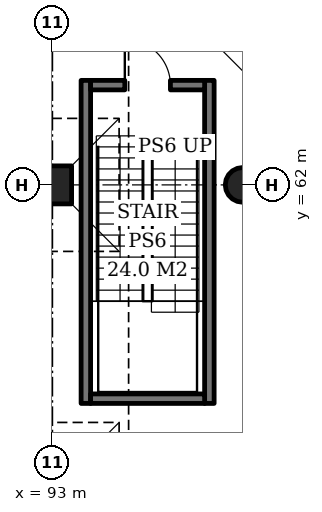
"""IFC4 building model, lengths in metres.
Left out: names, types, materials, properties, quantities, classifications, styles, units other than length and angle.
Written with IfcOpenShell. Run it as: python <this file> out.ifc"""

import sys

from ifc_helpers import new_model, si_unit, direction, frame, frame_2d, origin, origin_2d, place, context, subcontext, project, spatial, rectangle, hollow_circle, extrude, element, fill, save


model = new_model("IFC4")
c1 = context("Model", 3, precision=1e-05, world=origin(), true_north=direction((0.0, 1.0)))
c2 = subcontext(c1, "Body", "Model", "MODEL_VIEW")
j1 = project(units=[si_unit("LENGTHUNIT", "METRE"), si_unit("PLANEANGLEUNIT", "RADIAN")], contexts=[c1])
p1 = place(None, origin())
s1 = spatial("IfcSite", under=j1, at=p1, CompositionType="ELEMENT")
p2 = place(p1, origin())
s2 = spatial("IfcBuilding", under=s1, at=p2, CompositionType="ELEMENT")
p3 = place(p2, frame((0.0, 0.0, -10.0)))
s3 = spatial("IfcBuildingStorey", under=s2, at=p3, CompositionType="ELEMENT", Elevation=-10.0)
p4 = place(p3, frame((93.0, 62.0, 0.0), z_axis=(0.0, 0.0, 1.0), x_axis=(1.0, 0.0, 0.0)))
e1 = element("IfcColumn", 1, at=p4, inside=s3, PredefinedType="COLUMN", context=c2, shape_type="SweptSolid", body=[
    extrude(rectangle(XDim=1.0, YDim=1.0, at=origin_2d()), origin(), (0.0, 0.0, 1.0), 5.0),
])
p5 = place(p3, frame((98.0, 62.0, 0.0), z_axis=(0.0, 0.0, 1.0), x_axis=(1.0, 0.0, 0.0)))
e2 = element("IfcColumn", 2, at=p5, inside=s3, PredefinedType="COLUMN", context=c2, shape_type="SweptSolid", body=[
    extrude(hollow_circle(Radius=0.457, WallThickness=0.03, at=origin_2d()), origin(), (0.0, 0.0, 1.0), 5.0),
])
for number, where, z_axis, x_axis in (
    (3, (93.875, 56.25, 0.0), (0.0, 0.0, 1.0), (0.0, 1.0, 0.0)),
    (4, (97.125, 56.25, 0.0), (0.0, 0.0, 1.0), (0.0, 1.0, 0.0)),
):
    element("IfcWall", number, at=place(p3, frame(where, z_axis=z_axis, x_axis=x_axis)), inside=s3, PredefinedType="SOLIDWALL", context=c2, shape_type="SweptSolid", body=[
        extrude(rectangle(XDim=8.5, YDim=0.25, at=frame_2d((4.25, 0.0))), origin(), (0.0, 0.0, 1.0), 4.7),
    ])
p6 = place(p3, frame((94.0, 56.375, 0.0), z_axis=(0.0, 0.0, 1.0), x_axis=(1.0, 0.0, 0.0)))
e5 = element("IfcWall", 5, at=p6, inside=s3, PredefinedType="SOLIDWALL", context=c2, shape_type="SweptSolid", body=[
    extrude(rectangle(XDim=3.0, YDim=0.25, at=frame_2d((1.5, 0.0))), origin(), (0.0, 0.0, 1.0), 4.7),
])
p7 = place(p3, frame((94.0, 64.625, 0.0), z_axis=(0.0, 0.0, 1.0), x_axis=(1.0, 0.0, 0.0)))
e6 = element("IfcWall", 6, at=p7, inside=s3, PredefinedType="SOLIDWALL", context=c2, shape_type="SweptSolid", body=[
    extrude(rectangle(XDim=3.0, YDim=0.25, at=frame_2d((1.5, 0.0))), origin(), (0.0, 0.0, 1.0), 4.7),
])
p8 = place(p7, frame((0.9, 0.0, 0.0)))
e7 = element("IfcOpeningElement", 7, at=p8, cuts=e6, PredefinedType="OPENING", context=c2, shape_type="SweptSolid", body=[
    extrude(rectangle(XDim=1.2, YDim=2.1, at=frame_2d((0.6, 1.05))), frame((0.0, 0.135, 0.0), z_axis=(0.0, -1.0, 0.0), x_axis=(1.0, 0.0, 0.0)), (0.0, 0.0, 1.0), 0.27),
])
p9 = place(p8, origin())
e8 = element("IfcDoor", 8, at=p9, inside=s3, OperationType="SINGLE_SWING_LEFT", PredefinedType="DOOR", context=c2, shape_type="SweptSolid", body=[
    extrude(rectangle(XDim=1.2, YDim=2.1, at=frame_2d((0.6, 1.05))), frame((0.0, 0.025, 0.0), z_axis=(0.0, -1.0, 0.0), x_axis=(1.0, 0.0, 0.0)), (0.0, 0.0, 1.0), 0.05),
])
fill(e7, e8)
save(model, sys.argv[1])
